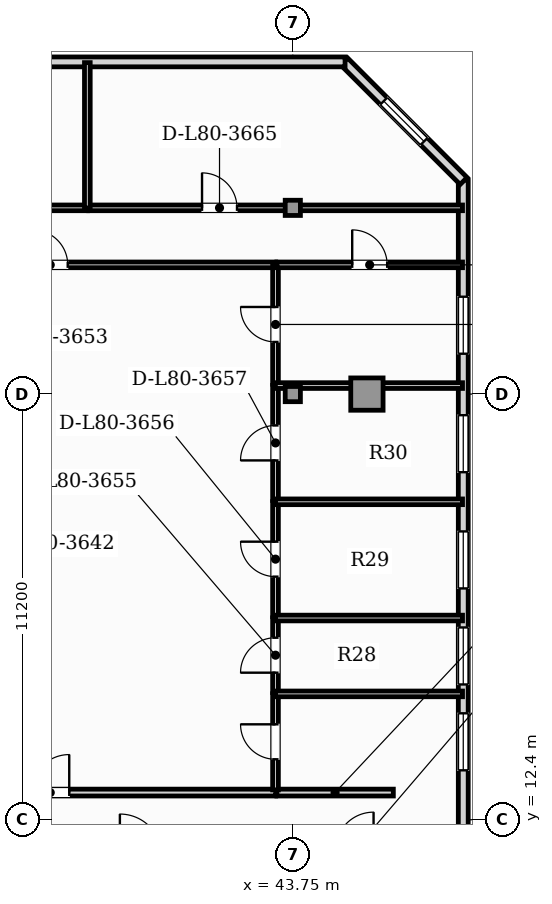
"""IFC4 building model, lengths in metres.
Left out: names, types, materials, properties, quantities, classifications, styles, units other than length and angle.
Written with IfcOpenShell. Run it as: python <this file> out.ifc"""

import sys

from ifc_helpers import new_model, si_unit, direction, frame, frame_2d, origin, origin_2d, place, context, subcontext, project, spatial, rectangle, hollow_rectangle, extrude, element, fill, save


model = new_model("IFC4")
c1 = context("Model", 3, precision=1e-05, world=origin(), true_north=direction((0.0, 1.0)))
c2 = subcontext(c1, "Body", "Model", "MODEL_VIEW")
j1 = project(units=[si_unit("LENGTHUNIT", "METRE"), si_unit("PLANEANGLEUNIT", "RADIAN")], contexts=[c1])
p1 = place(None, origin())
s1 = spatial("IfcSite", under=j1, at=p1, CompositionType="ELEMENT")
p2 = place(p1, origin())
s2 = spatial("IfcBuilding", under=s1, at=p2, CompositionType="ELEMENT")
p3 = place(p2, frame((0.0, 0.0, 324.6)))
s3 = spatial("IfcBuildingStorey", under=s2, at=p3, CompositionType="ELEMENT", Elevation=324.6)
p4 = place(p3, frame((45.7, 23.6, 0.0), z_axis=(0.0, 0.0, 1.0), x_axis=(1.0, 0.0, 0.0)))
e1 = element("IfcColumn", 1, at=p4, inside=s3, PredefinedType="USERDEFINED", context=c2, shape_type="SweptSolid", body=[
    extrude(hollow_rectangle(XDim=0.85, YDim=0.85, WallThickness=0.05, at=origin_2d()), origin(), (0.0, 0.0, 1.0), 3.85),
])
for number, where, z_axis, x_axis in (
    (2, (43.75, 23.6, 0.0), (0.0, 0.0, 1.0), (1.0, 0.0, 0.0)),
    (3, (43.75, 28.5, 0.0), (0.0, 0.0, 1.0), (1.0, 0.0, 0.0)),
):
    element("IfcColumn", number, at=place(p3, frame(where, z_axis=z_axis, x_axis=x_axis)), inside=s3, PredefinedType="COLUMN", context=c2, shape_type="SweptSolid", body=[
        extrude(hollow_rectangle(XDim=0.4, YDim=0.4, WallThickness=0.02, at=origin_2d()), origin(), (0.0, 0.0, 1.0), 3.85),
    ])
p5 = place(p3, frame((48.235, 3.24, 0.0), z_axis=(0.0, 0.0, 1.0), x_axis=(0.0, 1.0, 0.0)))
e4 = element("IfcWall", 4, at=p5, inside=s3, PredefinedType="SOLIDWALL", context=c2, shape_type="SweptSolid", body=[
    extrude(rectangle(XDim=25.991, YDim=0.26, at=frame_2d((12.995, 0.0))), origin(), (0.0, 0.0, 1.0), 3.65),
])
p6 = place(p5, frame((10.461, 0.0, 0.9)))
e5 = element("IfcOpeningElement", 5, at=p6, cuts=e4, PredefinedType="OPENING", context=c2, shape_type="SweptSolid", body=[
    extrude(rectangle(XDim=1.5, YDim=1.95, at=frame_2d((0.75, 0.975))), frame((0.0, 0.14, 0.0), z_axis=(0.0, -1.0, 0.0), x_axis=(1.0, 0.0, 0.0)), (0.0, 0.0, 1.0), 0.28),
])
p7 = place(p5, frame((12.719, 0.0, 0.9)))
e6 = element("IfcOpeningElement", 6, at=p7, cuts=e4, PredefinedType="OPENING", context=c2, shape_type="SweptSolid", body=[
    extrude(rectangle(XDim=1.5, YDim=1.95, at=frame_2d((0.75, 0.975))), frame((0.0, 0.14, 0.0), z_axis=(0.0, -1.0, 0.0), x_axis=(1.0, 0.0, 0.0)), (0.0, 0.0, 1.0), 0.28),
])
p8 = place(p5, frame((15.247, 0.0, 0.9)))
e7 = element("IfcOpeningElement", 7, at=p8, cuts=e4, PredefinedType="OPENING", context=c2, shape_type="SweptSolid", body=[
    extrude(rectangle(XDim=1.5, YDim=1.95, at=frame_2d((0.75, 0.975))), frame((0.0, 0.14, 0.0), z_axis=(0.0, -1.0, 0.0), x_axis=(1.0, 0.0, 0.0)), (0.0, 0.0, 1.0), 0.28),
])
p9 = place(p5, frame((18.305, 0.0, 0.9)))
e8 = element("IfcOpeningElement", 8, at=p9, cuts=e4, PredefinedType="OPENING", context=c2, shape_type="SweptSolid", body=[
    extrude(rectangle(XDim=1.5, YDim=1.95, at=frame_2d((0.75, 0.975))), frame((0.0, 0.14, 0.0), z_axis=(0.0, -1.0, 0.0), x_axis=(1.0, 0.0, 0.0)), (0.0, 0.0, 1.0), 0.28),
])
p10 = place(p5, frame((21.422, 0.0, 0.9)))
e9 = element("IfcOpeningElement", 9, at=p10, cuts=e4, PredefinedType="OPENING", context=c2, shape_type="SweptSolid", body=[
    extrude(rectangle(XDim=1.5, YDim=1.95, at=frame_2d((0.75, 0.975))), frame((0.0, 0.14, 0.0), z_axis=(0.0, -1.0, 0.0), x_axis=(1.0, 0.0, 0.0)), (0.0, 0.0, 1.0), 0.28),
])
p11 = place(p3, frame((48.245, 29.207, 0.0), z_axis=(0.0, 0.0, 1.0), x_axis=(-0.707106781187, 0.707106781187, 0.0)))
e10 = element("IfcWall", 10, at=p11, inside=s3, PredefinedType="SOLIDWALL", context=c2, shape_type="SweptSolid", body=[
    extrude(rectangle(XDim=4.445, YDim=0.26, at=frame_2d((2.223, 0.0))), origin(), (0.0, 0.0, 1.0), 3.65),
])
p12 = place(p11, frame((1.473, 0.0, 0.9)))
e11 = element("IfcOpeningElement", 11, at=p12, cuts=e10, PredefinedType="OPENING", context=c2, shape_type="SweptSolid", body=[
    extrude(rectangle(XDim=1.5, YDim=1.95, at=frame_2d((0.75, 0.975))), frame((0.0, 0.14, 0.0), z_axis=(0.0, -1.0, 0.0), x_axis=(1.0, 0.0, 0.0)), (0.0, 0.0, 1.0), 0.28),
])
p13 = place(p3, frame((45.125, 32.341, 0.0), z_axis=(0.0, 0.0, 1.0), x_axis=(-1.0, 0.0, 0.0)))
e12 = element("IfcWall", 12, at=p13, inside=s3, PredefinedType="SOLIDWALL", context=c2, shape_type="SweptSolid", body=[
    extrude(rectangle(XDim=32.75, YDim=0.26, at=frame_2d((16.375, 0.0))), origin(), (0.0, 0.0, 1.0), 3.65),
])
p14 = place(p13, frame((30.479, 0.0, 0.9)))
e13 = element("IfcOpeningElement", 13, at=p14, cuts=e12, PredefinedType="OPENING", context=c2, shape_type="SweptSolid", body=[
    extrude(rectangle(XDim=1.5, YDim=1.95, at=frame_2d((0.75, 0.975))), frame((0.0, 0.14, 0.0), z_axis=(0.0, -1.0, 0.0), x_axis=(1.0, 0.0, 0.0)), (0.0, 0.0, 1.0), 0.28),
])
p15 = place(p13, frame((18.707, 0.0, 0.9)))
e14 = element("IfcOpeningElement", 14, at=p15, cuts=e12, PredefinedType="OPENING", context=c2, shape_type="SweptSolid", body=[
    extrude(rectangle(XDim=1.5, YDim=1.95, at=frame_2d((0.75, 0.975))), frame((0.0, 0.14, 0.0), z_axis=(0.0, -1.0, 0.0), x_axis=(1.0, 0.0, 0.0)), (0.0, 0.0, 1.0), 0.28),
])
p16 = place(p13, frame((10.16, 0.0, 0.9)))
e15 = element("IfcOpeningElement", 15, at=p16, cuts=e12, PredefinedType="OPENING", context=c2, shape_type="SweptSolid", body=[
    extrude(rectangle(XDim=1.5, YDim=1.95, at=frame_2d((0.75, 0.975))), frame((0.0, 0.14, 0.0), z_axis=(0.0, -1.0, 0.0), x_axis=(1.0, 0.0, 0.0)), (0.0, 0.0, 1.0), 0.28),
])
p17 = place(p3, frame((31.435, 13.115, 0.0), z_axis=(0.0, 0.0, 1.0), x_axis=(1.0, 0.0, 0.0)))
e16 = element("IfcWall", 16, at=p17, inside=s3, PredefinedType="PARTITIONING", context=c2, shape_type="SweptSolid", body=[
    extrude(rectangle(XDim=11.865, YDim=0.18, at=frame_2d((5.932, 0.0))), origin(), (0.0, 0.0, 1.0), 3.65),
])
p18 = place(p17, frame((5.432, 0.0, 0.0)))
e17 = element("IfcOpeningElement", 17, at=p18, cuts=e16, PredefinedType="OPENING", context=c2, shape_type="SweptSolid", body=[
    extrude(rectangle(XDim=1.0, YDim=2.15, at=frame_2d((0.5, 1.075))), frame((0.0, 0.1, 0.0), z_axis=(0.0, -1.0, 0.0), x_axis=(1.0, 0.0, 0.0)), (0.0, 0.0, 1.0), 0.2),
])
p19 = place(p3, frame((43.33, 13.115, 0.0), z_axis=(0.0, 0.0, 1.0), x_axis=(1.0, 0.0, 0.0)))
e18 = element("IfcWall", 18, at=p19, inside=s3, PredefinedType="PARTITIONING", context=c2, shape_type="SweptSolid", body=[
    extrude(rectangle(XDim=3.065, YDim=0.18, at=frame_2d((1.533, 0.0))), origin(), (0.0, 0.0, 1.0), 3.65),
])
p20 = place(p3, frame((31.435, 27.0, 0.0), z_axis=(0.0, 0.0, 1.0), x_axis=(1.0, 0.0, 0.0)))
e19 = element("IfcWall", 19, at=p20, inside=s3, PredefinedType="PARTITIONING", context=c2, shape_type="SweptSolid", body=[
    extrude(rectangle(XDim=11.865, YDim=0.15, at=frame_2d((5.932, 0.0))), origin(), (0.0, 0.0, 1.0), 3.65),
])
p21 = place(p20, frame((5.472, 0.0, 0.0)))
e20 = element("IfcOpeningElement", 20, at=p21, cuts=e19, PredefinedType="OPENING", context=c2, shape_type="SweptSolid", body=[
    extrude(rectangle(XDim=0.92, YDim=2.1, at=frame_2d((0.46, 1.05))), frame((0.0, 0.085, 0.0), z_axis=(0.0, -1.0, 0.0), x_axis=(1.0, 0.0, 0.0)), (0.0, 0.0, 1.0), 0.17),
])
p22 = place(p3, frame((43.295, 13.185, 0.0), z_axis=(0.0, 0.0, 1.0), x_axis=(0.0, 1.0, 0.0)))
e21 = element("IfcWall", 21, at=p22, inside=s3, PredefinedType="PARTITIONING", context=c2, shape_type="SweptSolid", body=[
    extrude(rectangle(XDim=2.531, YDim=0.15, at=frame_2d((1.266, 0.0))), origin(), (0.0, 0.0, 1.0), 3.65),
])
p23 = place(p22, frame((0.806, 0.0, 0.0)))
e22 = element("IfcOpeningElement", 22, at=p23, cuts=e21, PredefinedType="OPENING", context=c2, shape_type="SweptSolid", body=[
    extrude(rectangle(XDim=0.92, YDim=2.1, at=frame_2d((0.46, 1.05))), frame((0.0, 0.085, 0.0), z_axis=(0.0, -1.0, 0.0), x_axis=(1.0, 0.0, 0.0)), (0.0, 0.0, 1.0), 0.17),
])
p24 = place(p3, frame((43.295, 15.747, 0.0), z_axis=(0.0, 0.0, 1.0), x_axis=(0.0, 1.0, 0.0)))
e23 = element("IfcWall", 23, at=p24, inside=s3, PredefinedType="PARTITIONING", context=c2, shape_type="SweptSolid", body=[
    extrude(rectangle(XDim=1.966, YDim=0.15, at=frame_2d((0.983, 0.0))), origin(), (0.0, 0.0, 1.0), 3.65),
])
p25 = place(p24, frame((0.523, 0.0, 0.0)))
e24 = element("IfcOpeningElement", 24, at=p25, cuts=e23, PredefinedType="OPENING", context=c2, shape_type="SweptSolid", body=[
    extrude(rectangle(XDim=0.92, YDim=2.1, at=frame_2d((0.46, 1.05))), frame((0.0, 0.085, 0.0), z_axis=(0.0, -1.0, 0.0), x_axis=(1.0, 0.0, 0.0)), (0.0, 0.0, 1.0), 0.17),
])
p26 = place(p3, frame((43.295, 17.743, 0.0), z_axis=(0.0, 0.0, 1.0), x_axis=(0.0, 1.0, 0.0)))
e25 = element("IfcWall", 25, at=p26, inside=s3, PredefinedType="PARTITIONING", context=c2, shape_type="SweptSolid", body=[
    extrude(rectangle(XDim=3.028, YDim=0.15, at=frame_2d((1.514, 0.0))), origin(), (0.0, 0.0, 1.0), 3.65),
])
p27 = place(p26, frame((1.054, 0.0, 0.0)))
e26 = element("IfcOpeningElement", 26, at=p27, cuts=e25, PredefinedType="OPENING", context=c2, shape_type="SweptSolid", body=[
    extrude(rectangle(XDim=0.92, YDim=2.1, at=frame_2d((0.46, 1.05))), frame((0.0, 0.085, 0.0), z_axis=(0.0, -1.0, 0.0), x_axis=(1.0, 0.0, 0.0)), (0.0, 0.0, 1.0), 0.17),
])
p28 = place(p3, frame((43.295, 20.801, 0.0), z_axis=(0.0, 0.0, 1.0), x_axis=(0.0, 1.0, 0.0)))
e27 = element("IfcWall", 27, at=p28, inside=s3, PredefinedType="PARTITIONING", context=c2, shape_type="SweptSolid", body=[
    extrude(rectangle(XDim=3.028, YDim=0.15, at=frame_2d((1.514, 0.0))), origin(), (0.0, 0.0, 1.0), 3.65),
])
p29 = place(p28, frame((1.054, 0.0, 0.0)))
e28 = element("IfcOpeningElement", 28, at=p29, cuts=e27, PredefinedType="OPENING", context=c2, shape_type="SweptSolid", body=[
    extrude(rectangle(XDim=0.92, YDim=2.1, at=frame_2d((0.46, 1.05))), frame((0.0, 0.085, 0.0), z_axis=(0.0, -1.0, 0.0), x_axis=(1.0, 0.0, 0.0)), (0.0, 0.0, 1.0), 0.17),
])
p30 = place(p3, frame((43.295, 23.859, 0.0), z_axis=(0.0, 0.0, 1.0), x_axis=(0.0, 1.0, 0.0)))
e29 = element("IfcWall", 29, at=p30, inside=s3, PredefinedType="PARTITIONING", context=c2, shape_type="SweptSolid", body=[
    extrude(rectangle(XDim=3.146, YDim=0.15, at=frame_2d((1.573, 0.0))), origin(), (0.0, 0.0, 1.0), 3.65),
])
p31 = place(p30, frame((1.113, 0.0, 0.0)))
e30 = element("IfcOpeningElement", 30, at=p31, cuts=e29, PredefinedType="OPENING", context=c2, shape_type="SweptSolid", body=[
    extrude(rectangle(XDim=0.92, YDim=2.1, at=frame_2d((0.46, 1.05))), frame((0.0, 0.085, 0.0), z_axis=(0.0, -1.0, 0.0), x_axis=(1.0, 0.0, 0.0)), (0.0, 0.0, 1.0), 0.17),
])
p32 = place(p3, frame((43.33, 27.0, 0.0), z_axis=(0.0, 0.0, 1.0), x_axis=(1.0, 0.0, 0.0)))
e31 = element("IfcWall", 31, at=p32, inside=s3, PredefinedType="PARTITIONING", context=c2, shape_type="SweptSolid", body=[
    extrude(rectangle(XDim=4.885, YDim=0.15, at=frame_2d((2.443, 0.0))), origin(), (0.0, 0.0, 1.0), 3.65),
])
p33 = place(p32, frame((1.983, 0.0, 0.0)))
e32 = element("IfcOpeningElement", 32, at=p33, cuts=e31, PredefinedType="OPENING", context=c2, shape_type="SweptSolid", body=[
    extrude(rectangle(XDim=0.92, YDim=2.1, at=frame_2d((0.46, 1.05))), frame((0.0, 0.085, 0.0), z_axis=(0.0, -1.0, 0.0), x_axis=(1.0, 0.0, 0.0)), (0.0, 0.0, 1.0), 0.17),
])
p34 = place(p3, frame((30.12, 28.5, 0.0), z_axis=(0.0, 0.0, 1.0), x_axis=(1.0, 0.0, 0.0)))
e33 = element("IfcWall", 33, at=p34, inside=s3, PredefinedType="PARTITIONING", context=c2, shape_type="SweptSolid", body=[
    extrude(rectangle(XDim=8.228, YDim=0.15, at=frame_2d((4.114, 0.0))), origin(), (0.0, 0.0, 1.0), 3.117),
])
p35 = place(p34, frame((3.654, 0.0, 0.0)))
e34 = element("IfcOpeningElement", 34, at=p35, cuts=e33, PredefinedType="OPENING", context=c2, shape_type="SweptSolid", body=[
    extrude(rectangle(XDim=0.92, YDim=2.1, at=frame_2d((0.46, 1.05))), frame((0.0, 0.085, 0.0), z_axis=(0.0, -1.0, 0.0), x_axis=(1.0, 0.0, 0.0)), (0.0, 0.0, 1.0), 0.17),
])
p36 = place(p3, frame((38.379, 28.5, 0.0), z_axis=(0.0, 0.0, 1.0), x_axis=(1.0, 0.0, 0.0)))
e35 = element("IfcWall", 35, at=p36, inside=s3, PredefinedType="PARTITIONING", context=c2, shape_type="SweptSolid", body=[
    extrude(rectangle(XDim=9.837, YDim=0.15, at=frame_2d((4.918, 0.0))), origin(), (0.0, 0.0, 1.0), 3.117),
])
p37 = place(p36, frame((2.983, 0.0, 0.0)))
e36 = element("IfcOpeningElement", 36, at=p37, cuts=e35, PredefinedType="OPENING", context=c2, shape_type="SweptSolid", body=[
    extrude(rectangle(XDim=0.92, YDim=2.1, at=frame_2d((0.46, 1.05))), frame((0.0, 0.085, 0.0), z_axis=(0.0, -1.0, 0.0), x_axis=(1.0, 0.0, 0.0)), (0.0, 0.0, 1.0), 0.17),
])
for number, where, z_axis, x_axis in (
    (37, (43.29, 15.711, 0.0), (0.0, 0.0, 1.0), (1.0, 0.0, 0.0)),
    (38, (43.29, 17.708, 0.0), (0.0, 0.0, 1.0), (1.0, 0.0, 0.0)),
    (39, (43.29, 20.766, 0.0), (0.0, 0.0, 1.0), (1.0, 0.0, 0.0)),
    (40, (43.29, 23.823, 0.0), (0.0, 0.0, 1.0), (1.0, 0.0, 0.0)),
):
    element("IfcWall", number, at=place(p3, frame(where, z_axis=z_axis, x_axis=x_axis)), inside=s3, PredefinedType="PARTITIONING", context=c2, shape_type="SweptSolid", body=[
        extrude(rectangle(XDim=4.926, YDim=0.15, at=frame_2d((2.463, 0.0))), origin(), (0.0, 0.0, 1.0), 3.65),
    ])
p38 = place(p3, frame((38.344, 28.495, 0.0), z_axis=(0.0, 0.0, 1.0), x_axis=(0.0, 1.0, 0.0)))
e41 = element("IfcWall", 41, at=p38, inside=s3, PredefinedType="PARTITIONING", context=c2, shape_type="SweptSolid", body=[
    extrude(rectangle(XDim=3.826, YDim=0.15, at=frame_2d((1.913, 0.0))), origin(), (0.0, 0.0, 1.0), 3.65),
])
p39 = place(p6, origin())
e42 = element("IfcWindow", 42, at=p39, inside=s3, PartitioningType="SINGLE_PANEL", PredefinedType="WINDOW", context=c2, shape_type="SweptSolid", body=[
    extrude(rectangle(XDim=1.5, YDim=1.95, at=frame_2d((0.75, 0.975))), frame((0.0, 0.03, 0.0), z_axis=(0.0, -1.0, 0.0), x_axis=(1.0, 0.0, 0.0)), (0.0, 0.0, 1.0), 0.06),
])
fill(e5, e42)
p40 = place(p7, origin())
e43 = element("IfcWindow", 43, at=p40, inside=s3, PartitioningType="SINGLE_PANEL", PredefinedType="WINDOW", context=c2, shape_type="SweptSolid", body=[
    extrude(rectangle(XDim=1.5, YDim=1.95, at=frame_2d((0.75, 0.975))), frame((0.0, 0.03, 0.0), z_axis=(0.0, -1.0, 0.0), x_axis=(1.0, 0.0, 0.0)), (0.0, 0.0, 1.0), 0.06),
])
fill(e6, e43)
p41 = place(p8, origin())
e44 = element("IfcWindow", 44, at=p41, inside=s3, PartitioningType="SINGLE_PANEL", PredefinedType="WINDOW", context=c2, shape_type="SweptSolid", body=[
    extrude(rectangle(XDim=1.5, YDim=1.95, at=frame_2d((0.75, 0.975))), frame((0.0, 0.03, 0.0), z_axis=(0.0, -1.0, 0.0), x_axis=(1.0, 0.0, 0.0)), (0.0, 0.0, 1.0), 0.06),
])
fill(e7, e44)
p42 = place(p9, origin())
e45 = element("IfcWindow", 45, at=p42, inside=s3, PartitioningType="SINGLE_PANEL", PredefinedType="WINDOW", context=c2, shape_type="SweptSolid", body=[
    extrude(rectangle(XDim=1.5, YDim=1.95, at=frame_2d((0.75, 0.975))), frame((0.0, 0.03, 0.0), z_axis=(0.0, -1.0, 0.0), x_axis=(1.0, 0.0, 0.0)), (0.0, 0.0, 1.0), 0.06),
])
fill(e8, e45)
p43 = place(p10, origin())
e46 = element("IfcWindow", 46, at=p43, inside=s3, PartitioningType="SINGLE_PANEL", PredefinedType="WINDOW", context=c2, shape_type="SweptSolid", body=[
    extrude(rectangle(XDim=1.5, YDim=1.95, at=frame_2d((0.75, 0.975))), frame((0.0, 0.03, 0.0), z_axis=(0.0, -1.0, 0.0), x_axis=(1.0, 0.0, 0.0)), (0.0, 0.0, 1.0), 0.06),
])
fill(e9, e46)
p44 = place(p12, origin())
e47 = element("IfcWindow", 47, at=p44, inside=s3, PartitioningType="SINGLE_PANEL", PredefinedType="WINDOW", context=c2, shape_type="SweptSolid", body=[
    extrude(rectangle(XDim=1.5, YDim=1.95, at=frame_2d((0.75, 0.975))), frame((0.0, 0.03, 0.0), z_axis=(0.0, -1.0, 0.0), x_axis=(1.0, 0.0, 0.0)), (0.0, 0.0, 1.0), 0.06),
])
fill(e11, e47)
p45 = place(p18, origin())
e48 = element("IfcDoor", 48, at=p45, inside=s3, OperationType="SINGLE_SWING_RIGHT", PredefinedType="DOOR", context=c2, shape_type="SweptSolid", body=[
    extrude(rectangle(XDim=1.0, YDim=2.15, at=frame_2d((0.5, 1.075))), frame((0.0, 0.025, 0.0), z_axis=(0.0, -1.0, 0.0), x_axis=(1.0, 0.0, 0.0)), (0.0, 0.0, 1.0), 0.05),
])
fill(e17, e48)
p46 = place(p21, origin())
e49 = element("IfcDoor", 49, at=p46, inside=s3, OperationType="SINGLE_SWING_LEFT", PredefinedType="DOOR", context=c2, shape_type="SweptSolid", body=[
    extrude(rectangle(XDim=0.92, YDim=2.1, at=frame_2d((0.46, 1.05))), frame((0.0, 0.025, 0.0), z_axis=(0.0, -1.0, 0.0), x_axis=(1.0, 0.0, 0.0)), (0.0, 0.0, 1.0), 0.05),
])
fill(e20, e49)
p47 = place(p23, origin())
e50 = element("IfcDoor", 50, at=p47, inside=s3, OperationType="SINGLE_SWING_RIGHT", PredefinedType="DOOR", context=c2, shape_type="SweptSolid", body=[
    extrude(rectangle(XDim=0.92, YDim=2.1, at=frame_2d((0.46, 1.05))), frame((0.0, 0.025, 0.0), z_axis=(0.0, -1.0, 0.0), x_axis=(1.0, 0.0, 0.0)), (0.0, 0.0, 1.0), 0.05),
])
fill(e22, e50)
p48 = place(p25, origin())
e51 = element("IfcDoor", 51, at=p48, inside=s3, OperationType="SINGLE_SWING_LEFT", PredefinedType="DOOR", context=c2, shape_type="SweptSolid", body=[
    extrude(rectangle(XDim=0.92, YDim=2.1, at=frame_2d((0.46, 1.05))), frame((0.0, 0.025, 0.0), z_axis=(0.0, -1.0, 0.0), x_axis=(1.0, 0.0, 0.0)), (0.0, 0.0, 1.0), 0.05),
])
fill(e24, e51)
p49 = place(p27, origin())
e52 = element("IfcDoor", 52, at=p49, inside=s3, OperationType="SINGLE_SWING_RIGHT", PredefinedType="DOOR", context=c2, shape_type="SweptSolid", body=[
    extrude(rectangle(XDim=0.92, YDim=2.1, at=frame_2d((0.46, 1.05))), frame((0.0, 0.025, 0.0), z_axis=(0.0, -1.0, 0.0), x_axis=(1.0, 0.0, 0.0)), (0.0, 0.0, 1.0), 0.05),
])
fill(e26, e52)
p50 = place(p29, origin())
e53 = element("IfcDoor", 53, at=p50, inside=s3, OperationType="SINGLE_SWING_LEFT", PredefinedType="DOOR", context=c2, shape_type="SweptSolid", body=[
    extrude(rectangle(XDim=0.92, YDim=2.1, at=frame_2d((0.46, 1.05))), frame((0.0, 0.025, 0.0), z_axis=(0.0, -1.0, 0.0), x_axis=(1.0, 0.0, 0.0)), (0.0, 0.0, 1.0), 0.05),
])
fill(e28, e53)
p51 = place(p31, origin())
e54 = element("IfcDoor", 54, at=p51, inside=s3, OperationType="SINGLE_SWING_RIGHT", PredefinedType="DOOR", context=c2, shape_type="SweptSolid", body=[
    extrude(rectangle(XDim=0.92, YDim=2.1, at=frame_2d((0.46, 1.05))), frame((0.0, 0.025, 0.0), z_axis=(0.0, -1.0, 0.0), x_axis=(1.0, 0.0, 0.0)), (0.0, 0.0, 1.0), 0.05),
])
fill(e30, e54)
p52 = place(p33, origin())
e55 = element("IfcDoor", 55, at=p52, inside=s3, OperationType="SINGLE_SWING_LEFT", PredefinedType="DOOR", context=c2, shape_type="SweptSolid", body=[
    extrude(rectangle(XDim=0.92, YDim=2.1, at=frame_2d((0.46, 1.05))), frame((0.0, 0.025, 0.0), z_axis=(0.0, -1.0, 0.0), x_axis=(1.0, 0.0, 0.0)), (0.0, 0.0, 1.0), 0.05),
])
fill(e32, e55)
p53 = place(p37, origin())
e56 = element("IfcDoor", 56, at=p53, inside=s3, OperationType="SINGLE_SWING_LEFT", PredefinedType="DOOR", context=c2, shape_type="SweptSolid", body=[
    extrude(rectangle(XDim=0.92, YDim=2.1, at=frame_2d((0.46, 1.05))), frame((0.0, 0.025, 0.0), z_axis=(0.0, -1.0, 0.0), x_axis=(1.0, 0.0, 0.0)), (0.0, 0.0, 1.0), 0.05),
])
fill(e36, e56)
save(model, sys.argv[1])
